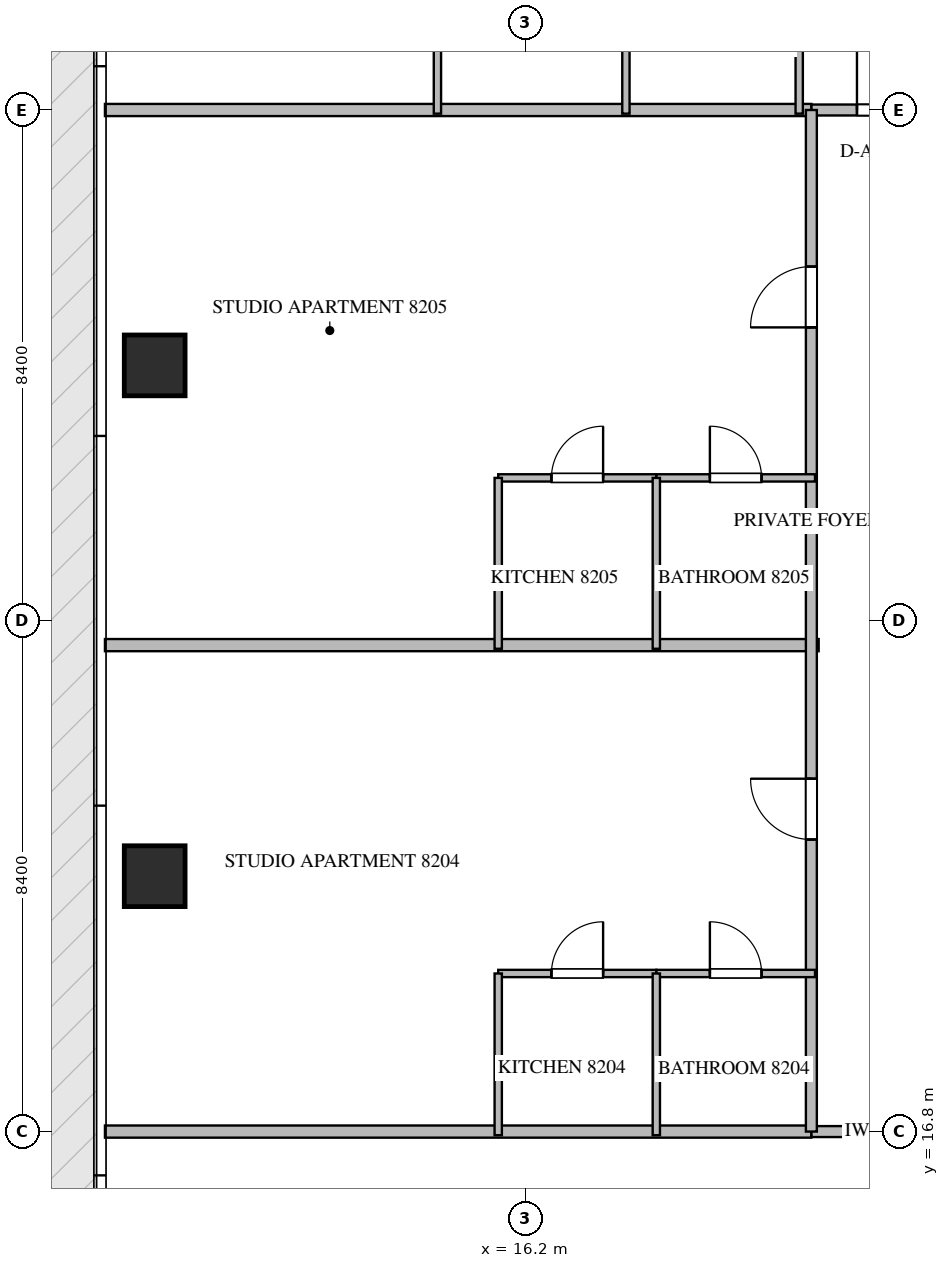
"""IFC4 building model, lengths in metres.
Left out: names, types, materials, properties, quantities, classifications, styles, units other than length and angle.
Written with IfcOpenShell. Run it as: python <this file> out.ifc"""

import sys

from ifc_helpers import new_model, si_unit, direction, frame, frame_2d, origin, origin_2d, place, context, subcontext, project, spatial, rectangle, extrude, source, transform, mapped, element, fill, save


model = new_model("IFC4")
c1 = context("Model", 3, precision=1e-05, world=origin(), true_north=direction((0.0, 1.0)))
c2 = subcontext(c1, "Body", "Model", "MODEL_VIEW")
j1 = project(units=[si_unit("LENGTHUNIT", "METRE"), si_unit("PLANEANGLEUNIT", "RADIAN")], contexts=[c1])
p1 = place(None, origin())
s1 = spatial("IfcSite", under=j1, at=p1, CompositionType="ELEMENT")
p2 = place(p1, origin())
s2 = spatial("IfcBuilding", under=s1, at=p2, CompositionType="ELEMENT")
p3 = place(p2, frame((0.0, 0.0, 329.9)))
s3 = spatial("IfcBuildingStorey", under=s2, at=p3, CompositionType="ELEMENT", Elevation=329.9)
m1 = source(origin(), c2, "Body", "SweptSolid", [
    extrude(rectangle(XDim=1.0, YDim=1.0, at=origin_2d()), origin(), (0.0, 0.0, 1.0), 4.05),
])
for number, where, z_axis, x_axis in (
    (1, (10.1, 21.0, -0.26), (0.0, 0.0, 1.0), (1.0, 0.0, 0.0)),
    (2, (10.1, 29.4, -0.26), (0.0, 0.0, 1.0), (1.0, 0.0, 0.0)),
):
    element("IfcColumn", number, at=place(p3, frame(where, z_axis=z_axis, x_axis=x_axis)), inside=s3, PredefinedType="COLUMN", context=c2, shape_type="MappedRepresentation", body=[
        mapped(m1, transform((0.0, 0.0, 0.0), scale=1.0)),
    ])
p4 = place(p3, frame((9.282, 24.8, 0.0), z_axis=(0.0, 0.0, 1.0), x_axis=(1.0, 0.0, 0.0)))
e3 = element("IfcWall", 3, at=p4, inside=s3, PredefinedType="PARTITIONING", context=c2, shape_type="SweptSolid", body=[
    extrude(rectangle(XDim=11.738, YDim=0.2, at=frame_2d((5.869, 0.0))), origin(), (0.0, 0.0, 1.0), 3.79),
])
for number, where, z_axis, x_axis in (
    (4, (9.282, 16.8, 0.0), (0.0, 0.0, 1.0), (1.0, 0.0, 0.0)),
    (5, (9.282, 33.6, 0.0), (0.0, 0.0, 1.0), (1.0, 0.0, 0.0)),
):
    element("IfcWall", number, at=place(p3, frame(where, z_axis=z_axis, x_axis=x_axis)), inside=s3, PredefinedType="PARTITIONING", context=c2, shape_type="SweptSolid", body=[
        extrude(rectangle(XDim=11.618, YDim=0.2, at=frame_2d((5.809, 0.0))), origin(), (0.0, 0.0, 1.0), 3.79),
    ])
p5 = place(p3, frame((20.902, 16.8, 0.0), z_axis=(0.0, 0.0, 1.0), x_axis=(1.0, 0.0, 0.0)))
e6 = element("IfcWall", 6, at=p5, inside=s3, PredefinedType="PARTITIONING", context=c2, shape_type="SweptSolid", body=[
    extrude(rectangle(XDim=2.496, YDim=0.18, at=frame_2d((1.248, 0.0))), origin(), (0.0, 0.0, 1.0), 3.79),
])
p6 = place(p3, frame((20.902, 33.6, 0.0), z_axis=(0.0, 0.0, 1.0), x_axis=(1.0, 0.0, 0.0)))
e7 = element("IfcWall", 7, at=p6, inside=s3, PredefinedType="PARTITIONING", context=c2, shape_type="SweptSolid", body=[
    extrude(rectangle(XDim=2.496, YDim=0.18, at=frame_2d((1.248, 0.0))), origin(), (0.0, 0.0, 1.0), 3.79),
])
p7 = place(p6, frame((0.748, 0.0, 0.0)))
e8 = element("IfcOpeningElement", 8, at=p7, cuts=e7, PredefinedType="OPENING", context=c2, shape_type="SweptSolid", body=[
    extrude(rectangle(XDim=1.0, YDim=2.15, at=frame_2d((0.5, 1.075))), frame((0.0, 0.1, 0.0), z_axis=(0.0, -1.0, 0.0), x_axis=(1.0, 0.0, 0.0)), (0.0, 0.0, 1.0), 0.2),
])
p8 = place(p3, frame((20.9, 16.8, 0.0), z_axis=(0.0, 0.0, 1.0), x_axis=(0.0, 1.0, 0.0)))
e9 = element("IfcWall", 9, at=p8, inside=s3, PredefinedType="PARTITIONING", context=c2, shape_type="SweptSolid", body=[
    extrude(rectangle(XDim=16.8, YDim=0.18, at=frame_2d((8.4, 0.0))), origin(), (0.0, 0.0, 1.0), 3.79),
])
p9 = place(p8, frame((4.803, 0.0, 0.0)))
e10 = element("IfcOpeningElement", 10, at=p9, cuts=e9, PredefinedType="OPENING", context=c2, shape_type="SweptSolid", body=[
    extrude(rectangle(XDim=1.0, YDim=2.15, at=frame_2d((0.5, 1.075))), frame((0.0, 0.1, 0.0), z_axis=(0.0, -1.0, 0.0), x_axis=(1.0, 0.0, 0.0)), (0.0, 0.0, 1.0), 0.2),
])
p10 = place(p8, frame((13.225, 0.0, 0.0)))
e11 = element("IfcOpeningElement", 11, at=p10, cuts=e9, PredefinedType="OPENING", context=c2, shape_type="SweptSolid", body=[
    extrude(rectangle(XDim=1.0, YDim=2.15, at=frame_2d((0.5, 1.075))), frame((0.0, 0.1, 0.0), z_axis=(0.0, -1.0, 0.0), x_axis=(1.0, 0.0, 0.0)), (0.0, 0.0, 1.0), 0.2),
])
p11 = place(p3, frame((20.7, 36.35, 0.0), z_axis=(0.0, 0.0, 1.0), x_axis=(0.0, -1.0, 0.0)))
e12 = element("IfcWall", 12, at=p11, inside=s3, PredefinedType="PARTITIONING", context=c2, shape_type="SweptSolid", body=[
    extrude(rectangle(XDim=2.81, YDim=0.12, at=frame_2d((1.405, 0.0))), origin(), (0.0, 0.0, 1.0), 3.79),
])
p12 = place(p3, frame((14.75, 37.807, 0.0), z_axis=(0.0, 0.0, 1.0), x_axis=(0.0, -1.0, 0.0)))
e13 = element("IfcWall", 13, at=p12, inside=s3, PredefinedType="PARTITIONING", context=c2, shape_type="SweptSolid", body=[
    extrude(rectangle(XDim=4.267, YDim=0.12, at=frame_2d((2.133, 0.0))), origin(), (0.0, 0.0, 1.0), 3.79),
])
p13 = place(p3, frame((17.85, 37.805, 0.0), z_axis=(0.0, 0.0, 1.0), x_axis=(0.0, -1.0, 0.0)))
e14 = element("IfcWall", 14, at=p13, inside=s3, PredefinedType="PARTITIONING", context=c2, shape_type="SweptSolid", body=[
    extrude(rectangle(XDim=4.265, YDim=0.12, at=frame_2d((2.132, 0.0))), origin(), (0.0, 0.0, 1.0), 3.372),
])
p14 = place(p13, frame((1.848, 0.0, 0.0)))
e15 = element("IfcOpeningElement", 15, at=p14, cuts=e14, PredefinedType="OPENING", context=c2, shape_type="SweptSolid", body=[
    extrude(rectangle(XDim=0.85, YDim=2.1, at=frame_2d((0.425, 1.05))), frame((0.0, 0.07, 0.0), z_axis=(0.0, -1.0, 0.0), x_axis=(1.0, 0.0, 0.0)), (0.0, 0.0, 1.0), 0.14),
])
p15 = place(p3, frame((15.75, 19.4, 0.0), z_axis=(0.0, 0.0, 1.0), x_axis=(1.0, 0.0, 0.0)))
e16 = element("IfcWall", 16, at=p15, inside=s3, PredefinedType="PARTITIONING", context=c2, shape_type="SweptSolid", body=[
    extrude(rectangle(XDim=2.6, YDim=0.12, at=frame_2d((1.3, 0.0))), origin(), (0.0, 0.0, 1.0), 3.79),
])
p16 = place(p15, frame((0.875, 0.0, 0.0)))
e17 = element("IfcOpeningElement", 17, at=p16, cuts=e16, PredefinedType="OPENING", context=c2, shape_type="SweptSolid", body=[
    extrude(rectangle(XDim=0.85, YDim=2.1, at=frame_2d((0.425, 1.05))), frame((0.0, 0.07, 0.0), z_axis=(0.0, -1.0, 0.0), x_axis=(1.0, 0.0, 0.0)), (0.0, 0.0, 1.0), 0.14),
])
p17 = place(p3, frame((18.352, 19.4, 0.0), z_axis=(0.0, 0.0, 1.0), x_axis=(1.0, 0.0, 0.0)))
e18 = element("IfcWall", 18, at=p17, inside=s3, PredefinedType="PARTITIONING", context=c2, shape_type="SweptSolid", body=[
    extrude(rectangle(XDim=2.608, YDim=0.12, at=frame_2d((1.304, 0.0))), origin(), (0.0, 0.0, 1.0), 3.79),
])
p18 = place(p17, frame((0.879, 0.0, 0.0)))
e19 = element("IfcOpeningElement", 19, at=p18, cuts=e18, PredefinedType="OPENING", context=c2, shape_type="SweptSolid", body=[
    extrude(rectangle(XDim=0.85, YDim=2.1, at=frame_2d((0.425, 1.05))), frame((0.0, 0.07, 0.0), z_axis=(0.0, -1.0, 0.0), x_axis=(1.0, 0.0, 0.0)), (0.0, 0.0, 1.0), 0.14),
])
for number, where, z_axis, x_axis in (
    (20, (18.35, 16.74, 0.0), (0.0, 0.0, 1.0), (0.0, 1.0, 0.0)),
    (21, (15.75, 16.74, 0.0), (0.0, 0.0, 1.0), (0.0, 1.0, 0.0)),
):
    element("IfcWall", number, at=place(p3, frame(where, z_axis=z_axis, x_axis=x_axis)), inside=s3, PredefinedType="PARTITIONING", context=c2, shape_type="SweptSolid", body=[
        extrude(rectangle(XDim=2.66, YDim=0.12, at=frame_2d((1.33, 0.0))), origin(), (0.0, 0.0, 1.0), 3.79),
    ])
p19 = place(p3, frame((15.75, 27.55, 0.0), z_axis=(0.0, 0.0, 1.0), x_axis=(1.0, 0.0, 0.0)))
e22 = element("IfcWall", 22, at=p19, inside=s3, PredefinedType="PARTITIONING", context=c2, shape_type="SweptSolid", body=[
    extrude(rectangle(XDim=2.6, YDim=0.12, at=frame_2d((1.3, 0.0))), origin(), (0.0, 0.0, 1.0), 3.79),
])
p20 = place(p19, frame((0.875, 0.0, 0.0)))
e23 = element("IfcOpeningElement", 23, at=p20, cuts=e22, PredefinedType="OPENING", context=c2, shape_type="SweptSolid", body=[
    extrude(rectangle(XDim=0.85, YDim=2.1, at=frame_2d((0.425, 1.05))), frame((0.0, 0.07, 0.0), z_axis=(0.0, -1.0, 0.0), x_axis=(1.0, 0.0, 0.0)), (0.0, 0.0, 1.0), 0.14),
])
p21 = place(p3, frame((18.352, 27.55, 0.0), z_axis=(0.0, 0.0, 1.0), x_axis=(1.0, 0.0, 0.0)))
e24 = element("IfcWall", 24, at=p21, inside=s3, PredefinedType="PARTITIONING", context=c2, shape_type="SweptSolid", body=[
    extrude(rectangle(XDim=2.608, YDim=0.12, at=frame_2d((1.304, 0.0))), origin(), (0.0, 0.0, 1.0), 3.79),
])
p22 = place(p21, frame((0.879, 0.0, 0.0)))
e25 = element("IfcOpeningElement", 25, at=p22, cuts=e24, PredefinedType="OPENING", context=c2, shape_type="SweptSolid", body=[
    extrude(rectangle(XDim=0.85, YDim=2.1, at=frame_2d((0.425, 1.05))), frame((0.0, 0.07, 0.0), z_axis=(0.0, -1.0, 0.0), x_axis=(1.0, 0.0, 0.0)), (0.0, 0.0, 1.0), 0.14),
])
for number, where, z_axis, x_axis in (
    (26, (18.35, 24.74, 0.0), (0.0, 0.0, 1.0), (0.0, 1.0, 0.0)),
    (27, (15.75, 24.74, 0.0), (0.0, 0.0, 1.0), (0.0, 1.0, 0.0)),
):
    element("IfcWall", number, at=place(p3, frame(where, z_axis=z_axis, x_axis=x_axis)), inside=s3, PredefinedType="PARTITIONING", context=c2, shape_type="SweptSolid", body=[
        extrude(rectangle(XDim=2.81, YDim=0.12, at=frame_2d((1.405, 0.0))), origin(), (0.0, 0.0, 1.0), 3.79),
    ])
m2 = source(origin(), c2, "Body", "SweptSolid", [
    extrude(rectangle(XDim=1.0, YDim=2.15, at=frame_2d((0.5, 1.075))), frame((0.0, 0.025, 0.0), z_axis=(0.0, -1.0, 0.0), x_axis=(1.0, 0.0, 0.0)), (0.0, 0.0, 1.0), 0.05),
])
p23 = place(p7, origin())
e28 = element("IfcDoor", 28, at=p23, inside=s3, OperationType="SINGLE_SWING_LEFT", PredefinedType="DOOR", context=c2, shape_type="MappedRepresentation", body=[
    mapped(m2, transform((0.0, 0.0, 0.0), scale=1.0)),
])
fill(e8, e28)
p24 = place(p9, origin())
e29 = element("IfcDoor", 29, at=p24, inside=s3, OperationType="SINGLE_SWING_RIGHT", PredefinedType="DOOR", context=c2, shape_type="MappedRepresentation", body=[
    mapped(m2, transform((0.0, 0.0, 0.0), scale=1.0)),
])
fill(e10, e29)
p25 = place(p10, origin())
e30 = element("IfcDoor", 30, at=p25, inside=s3, OperationType="SINGLE_SWING_LEFT", PredefinedType="DOOR", context=c2, shape_type="MappedRepresentation", body=[
    mapped(m2, transform((0.0, 0.0, 0.0), scale=1.0)),
])
fill(e11, e30)
m3 = source(origin(), c2, "Body", "SweptSolid", [
    extrude(rectangle(XDim=0.85, YDim=2.1, at=frame_2d((0.425, 1.05))), frame((0.0, 0.025, 0.0), z_axis=(0.0, -1.0, 0.0), x_axis=(1.0, 0.0, 0.0)), (0.0, 0.0, 1.0), 0.05),
])
p26 = place(p16, origin())
e31 = element("IfcDoor", 31, at=p26, inside=s3, OperationType="SINGLE_SWING_RIGHT", PredefinedType="DOOR", context=c2, shape_type="MappedRepresentation", body=[
    mapped(m3, transform((0.0, 0.0, 0.0), scale=1.0)),
])
fill(e17, e31)
p27 = place(p18, origin())
e32 = element("IfcDoor", 32, at=p27, inside=s3, OperationType="SINGLE_SWING_LEFT", PredefinedType="DOOR", context=c2, shape_type="MappedRepresentation", body=[
    mapped(m3, transform((0.0, 0.0, 0.0), scale=1.0)),
])
fill(e19, e32)
p28 = place(p20, origin())
e33 = element("IfcDoor", 33, at=p28, inside=s3, OperationType="SINGLE_SWING_RIGHT", PredefinedType="DOOR", context=c2, shape_type="MappedRepresentation", body=[
    mapped(m3, transform((0.0, 0.0, 0.0), scale=1.0)),
])
fill(e23, e33)
p29 = place(p22, origin())
e34 = element("IfcDoor", 34, at=p29, inside=s3, OperationType="SINGLE_SWING_LEFT", PredefinedType="DOOR", context=c2, shape_type="MappedRepresentation", body=[
    mapped(m3, transform((0.0, 0.0, 0.0), scale=1.0)),
])
fill(e25, e34)
save(model, sys.argv[1])
